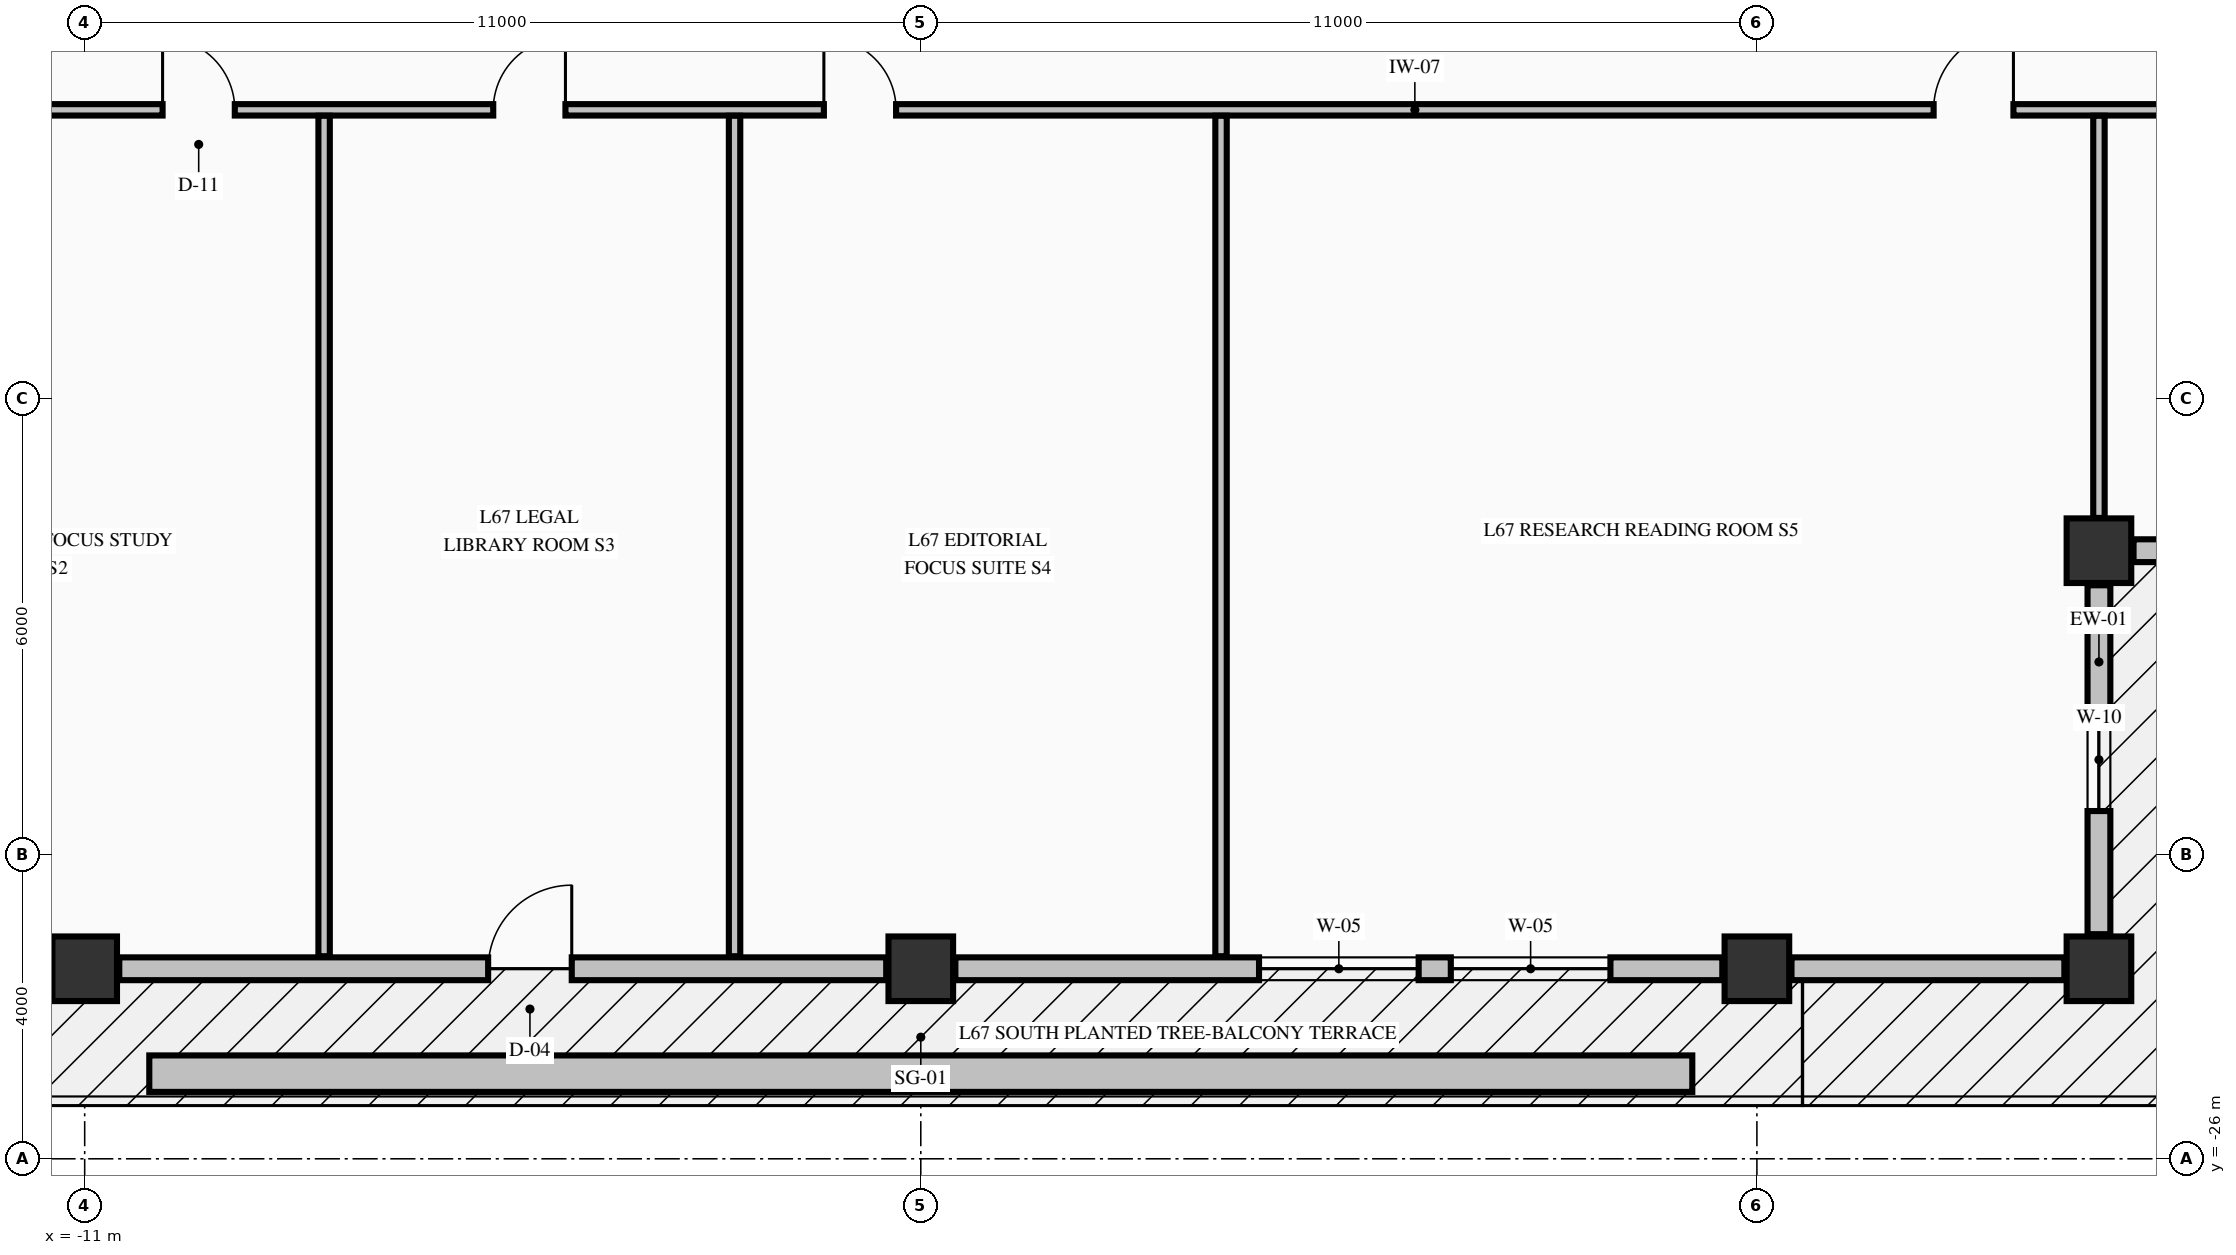
"""IFC4 building model, lengths in metres.
Left out: names, types, materials, properties, quantities, classifications, styles, units other than length and angle.
Written with IfcOpenShell. Run it as: python <this file> out.ifc"""

import sys

from ifc_helpers import new_model, si_unit, direction, frame, frame_2d, origin, origin_2d, place, context, subcontext, project, spatial, rectangle, extrude, element, fill, save


model = new_model("IFC4")
c1 = context("Model", 3, precision=1e-05, world=origin(), true_north=direction((0.0, 1.0)))
c2 = subcontext(c1, "Body", "Model", "MODEL_VIEW")
j1 = project(units=[si_unit("LENGTHUNIT", "METRE"), si_unit("PLANEANGLEUNIT", "RADIAN")], contexts=[c1])
p1 = place(None, origin())
s1 = spatial("IfcSite", under=j1, at=p1, CompositionType="ELEMENT")
p2 = place(p1, origin())
s2 = spatial("IfcBuilding", under=s1, at=p2, CompositionType="ELEMENT")
p3 = place(p2, frame((0.0, 0.0, 254.43)))
s3 = spatial("IfcBuildingStorey", under=s2, at=p3, CompositionType="ELEMENT", Elevation=254.43)
for number, where, z_axis, x_axis in (
    (1, (-11.0, -23.5, -0.425), (0.0, 0.0, 1.0), (1.0, 0.0, 0.0)),
    (2, (0.0, -23.5, -0.425), (0.0, 0.0, 1.0), (1.0, 0.0, 0.0)),
    (3, (11.0, -23.5, -0.425), (0.0, 0.0, 1.0), (1.0, 0.0, 0.0)),
    (4, (15.5, -23.5, -0.425), (0.0, 0.0, 1.0), (1.0, 0.0, 0.0)),
    (5, (15.5, -18.0, -0.425), (0.0, 0.0, 1.0), (1.0, 0.0, 0.0)),
):
    element("IfcColumn", number, at=place(p3, frame(where, z_axis=z_axis, x_axis=x_axis)), inside=s3, PredefinedType="COLUMN", context=c2, shape_type="SweptSolid", body=[
        extrude(rectangle(XDim=0.85, YDim=0.85, at=origin_2d()), origin(), (0.0, 0.0, 1.0), 3.405),
    ])
p4 = place(p3, frame((15.5, -23.045, 0.0), z_axis=(0.0, 0.0, 1.0), x_axis=(0.0, 1.0, 0.0)))
e6 = element("IfcWall", 6, at=p4, inside=s3, PredefinedType="STANDARD", context=c2, shape_type="SweptSolid", body=[
    extrude(rectangle(XDim=4.59, YDim=0.3, at=frame_2d((2.295, 0.0))), origin(), (0.0, 0.0, 1.0), 2.372),
])
p5 = place(p4, frame((1.62, 0.0, 0.68)))
e7 = element("IfcOpeningElement", 7, at=p5, cuts=e6, PredefinedType="OPENING", context=c2, shape_type="SweptSolid", body=[
    extrude(rectangle(XDim=1.35, YDim=1.42, at=frame_2d((0.675, 0.71))), frame((0.0, 0.16, 0.0), z_axis=(0.0, -1.0, 0.0), x_axis=(1.0, 0.0, 0.0)), (0.0, 0.0, 1.0), 0.32),
])
p6 = place(p3, frame((15.955, -18.0, 0.0), z_axis=(0.0, 0.0, 1.0), x_axis=(1.0, 0.0, 0.0)))
e8 = element("IfcWall", 8, at=p6, inside=s3, PredefinedType="STANDARD", context=c2, shape_type="SweptSolid", body=[
    extrude(rectangle(XDim=4.59, YDim=0.3, at=frame_2d((2.295, 0.0))), origin(), (0.0, 0.0, 1.0), 2.372),
])
p7 = place(p6, frame((1.62, 0.0, 0.68)))
e9 = element("IfcOpeningElement", 9, at=p7, cuts=e8, PredefinedType="OPENING", context=c2, shape_type="SweptSolid", body=[
    extrude(rectangle(XDim=1.35, YDim=1.42, at=frame_2d((0.675, 0.71))), frame((0.0, 0.16, 0.0), z_axis=(0.0, -1.0, 0.0), x_axis=(1.0, 0.0, 0.0)), (0.0, 0.0, 1.0), 0.32),
])
p8 = place(p3, frame((-10.545, -23.5, 0.0), z_axis=(0.0, 0.0, 1.0), x_axis=(1.0, 0.0, 0.0)))
e10 = element("IfcWall", 10, at=p8, inside=s3, PredefinedType="STANDARD", context=c2, shape_type="SweptSolid", body=[
    extrude(rectangle(XDim=10.09, YDim=0.3, at=frame_2d((5.045, 0.0))), origin(), (0.0, 0.0, 1.0), 2.372),
])
p9 = place(p8, frame((4.853, 0.0, 0.0)))
e11 = element("IfcOpeningElement", 11, at=p9, cuts=e10, PredefinedType="OPENING", context=c2, shape_type="SweptSolid", body=[
    extrude(rectangle(XDim=1.1, YDim=2.15, at=frame_2d((0.55, 1.075))), frame((0.0, 0.16, 0.0), z_axis=(0.0, -1.0, 0.0), x_axis=(1.0, 0.0, 0.0)), (0.0, 0.0, 1.0), 0.32),
])
p10 = place(p3, frame((0.455, -23.5, 0.0), z_axis=(0.0, 0.0, 1.0), x_axis=(1.0, 0.0, 0.0)))
e12 = element("IfcWall", 12, at=p10, inside=s3, PredefinedType="STANDARD", context=c2, shape_type="SweptSolid", body=[
    extrude(rectangle(XDim=10.09, YDim=0.3, at=frame_2d((5.045, 0.0))), origin(), (0.0, 0.0, 1.0), 2.372),
])
p11 = place(p10, frame((3.995, 0.0, 0.7)))
e13 = element("IfcOpeningElement", 13, at=p11, cuts=e12, PredefinedType="OPENING", context=c2, shape_type="SweptSolid", body=[
    extrude(rectangle(XDim=2.1, YDim=1.5, at=frame_2d((1.05, 0.75))), frame((0.0, 0.16, 0.0), z_axis=(0.0, -1.0, 0.0), x_axis=(1.0, 0.0, 0.0)), (0.0, 0.0, 1.0), 0.32),
])
p12 = place(p10, frame((6.518, 0.0, 0.7)))
e14 = element("IfcOpeningElement", 14, at=p12, cuts=e12, PredefinedType="OPENING", context=c2, shape_type="SweptSolid", body=[
    extrude(rectangle(XDim=2.1, YDim=1.5, at=frame_2d((1.05, 0.75))), frame((0.0, 0.16, 0.0), z_axis=(0.0, -1.0, 0.0), x_axis=(1.0, 0.0, 0.0)), (0.0, 0.0, 1.0), 0.32),
])
p13 = place(p3, frame((11.455, -23.5, 0.0), z_axis=(0.0, 0.0, 1.0), x_axis=(1.0, 0.0, 0.0)))
e15 = element("IfcWall", 15, at=p13, inside=s3, PredefinedType="STANDARD", context=c2, shape_type="SweptSolid", body=[
    extrude(rectangle(XDim=3.59, YDim=0.3, at=frame_2d((1.795, 0.0))), origin(), (0.0, 0.0, 1.0), 2.372),
])
p14 = place(p3, frame((-25.835, -12.2, 0.0), z_axis=(0.0, 0.0, 1.0), x_axis=(1.0, 0.0, 0.0)))
e16 = element("IfcWall", 16, at=p14, inside=s3, PredefinedType="PARTITIONING", context=c2, shape_type="SweptSolid", body=[
    extrude(rectangle(XDim=45.91, YDim=0.15, at=frame_2d((22.955, 0.0))), origin(), (0.0, 0.0, 1.0), 2.98),
])
p15 = place(p14, frame((8.04, 0.0, 0.0)))
e17 = element("IfcOpeningElement", 17, at=p15, cuts=e16, PredefinedType="OPENING", context=c2, shape_type="SweptSolid", body=[
    extrude(rectangle(XDim=0.95, YDim=2.15, at=frame_2d((0.475, 1.075))), frame((0.0, 0.085, 0.0), z_axis=(0.0, -1.0, 0.0), x_axis=(1.0, 0.0, 0.0)), (0.0, 0.0, 1.0), 0.17),
])
p16 = place(p14, frame((15.86, 0.0, 0.0)))
e18 = element("IfcOpeningElement", 18, at=p16, cuts=e16, PredefinedType="OPENING", context=c2, shape_type="SweptSolid", body=[
    extrude(rectangle(XDim=0.95, YDim=2.15, at=frame_2d((0.475, 1.075))), frame((0.0, 0.085, 0.0), z_axis=(0.0, -1.0, 0.0), x_axis=(1.0, 0.0, 0.0)), (0.0, 0.0, 1.0), 0.17),
])
p17 = place(p14, frame((20.21, 0.0, 0.0)))
e19 = element("IfcOpeningElement", 19, at=p17, cuts=e16, PredefinedType="OPENING", context=c2, shape_type="SweptSolid", body=[
    extrude(rectangle(XDim=0.95, YDim=2.15, at=frame_2d((0.475, 1.075))), frame((0.0, 0.085, 0.0), z_axis=(0.0, -1.0, 0.0), x_axis=(1.0, 0.0, 0.0)), (0.0, 0.0, 1.0), 0.17),
])
p18 = place(p14, frame((24.56, 0.0, 0.0)))
e20 = element("IfcOpeningElement", 20, at=p18, cuts=e16, PredefinedType="OPENING", context=c2, shape_type="SweptSolid", body=[
    extrude(rectangle(XDim=0.95, YDim=2.15, at=frame_2d((0.475, 1.075))), frame((0.0, 0.085, 0.0), z_axis=(0.0, -1.0, 0.0), x_axis=(1.0, 0.0, 0.0)), (0.0, 0.0, 1.0), 0.17),
])
p19 = place(p14, frame((39.16, 0.0, 0.0)))
e21 = element("IfcOpeningElement", 21, at=p19, cuts=e16, PredefinedType="OPENING", context=c2, shape_type="SweptSolid", body=[
    extrude(rectangle(XDim=1.05, YDim=2.15, at=frame_2d((0.525, 1.075))), frame((0.0, 0.085, 0.0), z_axis=(0.0, -1.0, 0.0), x_axis=(1.0, 0.0, 0.0)), (0.0, 0.0, 1.0), 0.17),
])
for number, where, z_axis, x_axis in (
    (22, (-7.85, -23.335, 0.0), (0.0, 0.0, 1.0), (0.0, 1.0, 0.0)),
    (23, (-2.45, -23.335, 0.0), (0.0, 0.0, 1.0), (0.0, 1.0, 0.0)),
    (24, (3.95, -23.335, 0.0), (0.0, 0.0, 1.0), (0.0, 1.0, 0.0)),
):
    element("IfcWall", number, at=place(p3, frame(where, z_axis=z_axis, x_axis=x_axis)), inside=s3, PredefinedType="PARTITIONING", context=c2, shape_type="SweptSolid", body=[
        extrude(rectangle(XDim=11.057, YDim=0.15, at=frame_2d((5.528, 0.0))), origin(), (0.0, 0.0, 1.0), 2.98),
    ])
p20 = place(p3, frame((15.5, -17.569, 0.0), z_axis=(0.0, 0.0, 1.0), x_axis=(0.0, 1.0, 0.0)))
e25 = element("IfcWall", 25, at=p20, inside=s3, PredefinedType="PARTITIONING", context=c2, shape_type="SweptSolid", body=[
    extrude(rectangle(XDim=5.291, YDim=0.15, at=frame_2d((2.646, 0.0))), origin(), (0.0, 0.0, 1.0), 2.98),
])
p21 = place(p3, frame((-10.15, -24.88, -0.04), z_axis=(0.0, 0.0, 1.0), x_axis=(1.0, 0.0, 0.0)))
e26 = element("IfcWall", 26, at=p21, inside=s3, PredefinedType="PARAPET", context=c2, shape_type="SweptSolid", body=[
    extrude(rectangle(XDim=20.3, YDim=0.48, at=frame_2d((10.15, 0.0))), origin(), (0.0, 0.0, 1.0), 0.52),
])
p22 = place(p5, origin())
e27 = element("IfcWindow", 27, at=p22, inside=s3, PartitioningType="SINGLE_PANEL", PredefinedType="WINDOW", context=c2, shape_type="SweptSolid", body=[
    extrude(rectangle(XDim=1.35, YDim=1.42, at=frame_2d((0.675, 0.71))), frame((0.0, 0.03, 0.0), z_axis=(0.0, -1.0, 0.0), x_axis=(1.0, 0.0, 0.0)), (0.0, 0.0, 1.0), 0.06),
])
fill(e7, e27)
p23 = place(p9, origin())
e28 = element("IfcDoor", 28, at=p23, inside=s3, OperationType="SINGLE_SWING_RIGHT", PredefinedType="DOOR", context=c2, shape_type="SweptSolid", body=[
    extrude(rectangle(XDim=1.1, YDim=2.15, at=frame_2d((0.55, 1.075))), frame((0.0, 0.025, 0.0), z_axis=(0.0, -1.0, 0.0), x_axis=(1.0, 0.0, 0.0)), (0.0, 0.0, 1.0), 0.05),
])
fill(e11, e28)
p24 = place(p11, origin())
e29 = element("IfcWindow", 29, at=p24, inside=s3, PartitioningType="SINGLE_PANEL", PredefinedType="WINDOW", context=c2, shape_type="SweptSolid", body=[
    extrude(rectangle(XDim=2.1, YDim=1.5, at=frame_2d((1.05, 0.75))), frame((0.0, 0.03, 0.0), z_axis=(0.0, -1.0, 0.0), x_axis=(1.0, 0.0, 0.0)), (0.0, 0.0, 1.0), 0.06),
])
fill(e13, e29)
p25 = place(p12, origin())
e30 = element("IfcWindow", 30, at=p25, inside=s3, PartitioningType="SINGLE_PANEL", PredefinedType="WINDOW", context=c2, shape_type="SweptSolid", body=[
    extrude(rectangle(XDim=2.1, YDim=1.5, at=frame_2d((1.05, 0.75))), frame((0.0, 0.03, 0.0), z_axis=(0.0, -1.0, 0.0), x_axis=(1.0, 0.0, 0.0)), (0.0, 0.0, 1.0), 0.06),
])
fill(e14, e30)
p26 = place(p16, origin())
e31 = element("IfcDoor", 31, at=p26, inside=s3, OperationType="SINGLE_SWING_LEFT", PredefinedType="DOOR", context=c2, shape_type="SweptSolid", body=[
    extrude(rectangle(XDim=0.95, YDim=2.15, at=frame_2d((0.475, 1.075))), frame((0.0, 0.025, 0.0), z_axis=(0.0, -1.0, 0.0), x_axis=(1.0, 0.0, 0.0)), (0.0, 0.0, 1.0), 0.05),
])
fill(e18, e31)
p27 = place(p17, origin())
e32 = element("IfcDoor", 32, at=p27, inside=s3, OperationType="SINGLE_SWING_RIGHT", PredefinedType="DOOR", context=c2, shape_type="SweptSolid", body=[
    extrude(rectangle(XDim=0.95, YDim=2.15, at=frame_2d((0.475, 1.075))), frame((0.0, 0.025, 0.0), z_axis=(0.0, -1.0, 0.0), x_axis=(1.0, 0.0, 0.0)), (0.0, 0.0, 1.0), 0.05),
])
fill(e19, e32)
p28 = place(p18, origin())
e33 = element("IfcDoor", 33, at=p28, inside=s3, OperationType="SINGLE_SWING_LEFT", PredefinedType="DOOR", context=c2, shape_type="SweptSolid", body=[
    extrude(rectangle(XDim=0.95, YDim=2.15, at=frame_2d((0.475, 1.075))), frame((0.0, 0.025, 0.0), z_axis=(0.0, -1.0, 0.0), x_axis=(1.0, 0.0, 0.0)), (0.0, 0.0, 1.0), 0.05),
])
fill(e20, e33)
p29 = place(p19, origin())
e34 = element("IfcDoor", 34, at=p29, inside=s3, OperationType="SINGLE_SWING_RIGHT", PredefinedType="DOOR", context=c2, shape_type="SweptSolid", body=[
    extrude(rectangle(XDim=1.05, YDim=2.15, at=frame_2d((0.525, 1.075))), frame((0.0, 0.025, 0.0), z_axis=(0.0, -1.0, 0.0), x_axis=(1.0, 0.0, 0.0)), (0.0, 0.0, 1.0), 0.05),
])
fill(e21, e34)
save(model, sys.argv[1])
